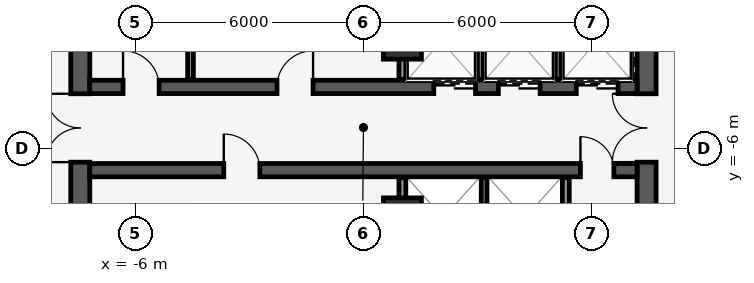
"""IFC4 building model, lengths in metres.
Left out: names, types, materials, properties, quantities, classifications, styles, units other than length and angle.
Written with IfcOpenShell. Run it as: python <this file> out.ifc"""

import sys

from ifc_helpers import new_model, si_unit, direction, frame, frame_2d, origin, origin_2d, place, context, subcontext, project, spatial, rectangle, extrude, element, fill, save


model = new_model("IFC4")
c1 = context("Model", 3, precision=1e-05, world=origin(), true_north=direction((0.0, 1.0)))
c2 = subcontext(c1, "Body", "Model", "MODEL_VIEW")
j1 = project(units=[si_unit("LENGTHUNIT", "METRE"), si_unit("PLANEANGLEUNIT", "RADIAN")], contexts=[c1])
p1 = place(None, origin())
s1 = spatial("IfcSite", under=j1, at=p1, CompositionType="ELEMENT")
p2 = place(p1, origin())
s2 = spatial("IfcBuilding", under=s1, at=p2, CompositionType="ELEMENT")
p3 = place(p2, frame((0.0, 0.0, 310.6)))
s3 = spatial("IfcBuildingStorey", under=s2, at=p3, CompositionType="ELEMENT", Elevation=310.6)
p4 = place(p3, frame((-7.45, -9.0, 0.0), z_axis=(0.0, 0.0, 1.0), x_axis=(0.0, 1.0, 0.0)))
e1 = element("IfcWall", 1, at=p4, inside=s3, PredefinedType="SHEAR", context=c2, shape_type="SweptSolid", body=[
    extrude(rectangle(XDim=9.1, YDim=0.5, at=frame_2d((4.55, 0.0))), origin(), (0.0, 0.0, 1.0), 3.85),
])
p5 = place(p4, frame((2.64, 0.0, 0.0)))
e2 = element("IfcOpeningElement", 2, at=p5, cuts=e1, PredefinedType="OPENING", context=c2, shape_type="SweptSolid", body=[
    extrude(rectangle(XDim=1.8, YDim=2.2, at=frame_2d((0.9, 1.1))), frame((0.0, 0.26, 0.0), z_axis=(0.0, -1.0, 0.0), x_axis=(1.0, 0.0, 0.0)), (0.0, 0.0, 1.0), 0.52),
])
p6 = place(p4, frame((7.55, 0.0, 0.0)))
e3 = element("IfcOpeningElement", 3, at=p6, cuts=e1, PredefinedType="OPENING", context=c2, shape_type="SweptSolid", body=[
    extrude(rectangle(XDim=1.2, YDim=2.15, at=frame_2d((0.6, 1.075))), frame((0.0, 0.26, 0.0), z_axis=(0.0, -1.0, 0.0), x_axis=(1.0, 0.0, 0.0)), (0.0, 0.0, 1.0), 0.52),
])
p7 = place(p3, frame((7.45, -9.0, 0.0), z_axis=(0.0, 0.0, 1.0), x_axis=(0.0, 1.0, 0.0)))
e4 = element("IfcWall", 4, at=p7, inside=s3, PredefinedType="SHEAR", context=c2, shape_type="SweptSolid", body=[
    extrude(rectangle(XDim=9.1, YDim=0.5, at=frame_2d((4.55, 0.0))), origin(), (0.0, 0.0, 1.0), 3.85),
])
p8 = place(p7, frame((2.64, 0.0, 0.0)))
e5 = element("IfcOpeningElement", 5, at=p8, cuts=e4, PredefinedType="OPENING", context=c2, shape_type="SweptSolid", body=[
    extrude(rectangle(XDim=1.8, YDim=2.2, at=frame_2d((0.9, 1.1))), frame((0.0, 0.26, 0.0), z_axis=(0.0, -1.0, 0.0), x_axis=(1.0, 0.0, 0.0)), (0.0, 0.0, 1.0), 0.52),
])
p9 = place(p7, frame((7.55, 0.0, 0.0)))
e6 = element("IfcOpeningElement", 6, at=p9, cuts=e4, PredefinedType="OPENING", context=c2, shape_type="SweptSolid", body=[
    extrude(rectangle(XDim=1.2, YDim=2.15, at=frame_2d((0.6, 1.075))), frame((0.0, 0.26, 0.0), z_axis=(0.0, -1.0, 0.0), x_axis=(1.0, 0.0, 0.0)), (0.0, 0.0, 1.0), 0.52),
])
p10 = place(p3, frame((-7.2, -4.38, 0.0), z_axis=(0.0, 0.0, 1.0), x_axis=(1.0, 0.0, 0.0)))
e7 = element("IfcWall", 7, at=p10, inside=s3, PredefinedType="SHEAR", context=c2, shape_type="SweptSolid", body=[
    extrude(rectangle(XDim=14.4, YDim=0.35, at=frame_2d((7.2, 0.0))), origin(), (0.0, 0.0, 1.0), 3.85),
])
p11 = place(p10, frame((9.05, 0.0, 0.0)))
e8 = element("IfcOpeningElement", 8, at=p11, cuts=e7, PredefinedType="OPENING", context=c2, shape_type="SweptSolid", body=[
    extrude(rectangle(XDim=1.1, YDim=2.2, at=frame_2d((0.55, 1.1))), frame((0.0, 0.185, 0.0), z_axis=(0.0, -1.0, 0.0), x_axis=(1.0, 0.0, 0.0)), (0.0, 0.0, 1.0), 0.37),
])
p12 = place(p10, frame((10.75, 0.0, 0.0)))
e9 = element("IfcOpeningElement", 9, at=p12, cuts=e7, PredefinedType="OPENING", context=c2, shape_type="SweptSolid", body=[
    extrude(rectangle(XDim=1.1, YDim=2.2, at=frame_2d((0.55, 1.1))), frame((0.0, 0.185, 0.0), z_axis=(0.0, -1.0, 0.0), x_axis=(1.0, 0.0, 0.0)), (0.0, 0.0, 1.0), 0.37),
])
p13 = place(p10, frame((12.8, 0.0, 0.0)))
e10 = element("IfcOpeningElement", 10, at=p13, cuts=e7, PredefinedType="OPENING", context=c2, shape_type="SweptSolid", body=[
    extrude(rectangle(XDim=1.1, YDim=2.2, at=frame_2d((0.55, 1.1))), frame((0.0, 0.185, 0.0), z_axis=(0.0, -1.0, 0.0), x_axis=(1.0, 0.0, 0.0)), (0.0, 0.0, 1.0), 0.37),
])
p14 = place(p10, frame((0.875, 0.0, 0.0)))
e11 = element("IfcOpeningElement", 11, at=p14, cuts=e7, PredefinedType="OPENING", context=c2, shape_type="SweptSolid", body=[
    extrude(rectangle(XDim=0.95, YDim=2.15, at=frame_2d((0.475, 1.075))), frame((0.0, 0.185, 0.0), z_axis=(0.0, -1.0, 0.0), x_axis=(1.0, 0.0, 0.0)), (0.0, 0.0, 1.0), 0.37),
])
p15 = place(p10, frame((4.925, 0.0, 0.0)))
e12 = element("IfcOpeningElement", 12, at=p15, cuts=e7, PredefinedType="OPENING", context=c2, shape_type="SweptSolid", body=[
    extrude(rectangle(XDim=0.95, YDim=2.15, at=frame_2d((0.475, 1.075))), frame((0.0, 0.185, 0.0), z_axis=(0.0, -1.0, 0.0), x_axis=(1.0, 0.0, 0.0)), (0.0, 0.0, 1.0), 0.37),
])
p16 = place(p3, frame((-7.2, -6.57, 0.0), z_axis=(0.0, 0.0, 1.0), x_axis=(1.0, 0.0, 0.0)))
e13 = element("IfcWall", 13, at=p16, inside=s3, PredefinedType="SHEAR", context=c2, shape_type="SweptSolid", body=[
    extrude(rectangle(XDim=14.4, YDim=0.35, at=frame_2d((7.2, 0.0))), origin(), (0.0, 0.0, 1.0), 3.85),
])
p17 = place(p16, frame((3.525, 0.0, 0.0)))
e14 = element("IfcOpeningElement", 14, at=p17, cuts=e13, PredefinedType="OPENING", context=c2, shape_type="SweptSolid", body=[
    extrude(rectangle(XDim=0.95, YDim=2.15, at=frame_2d((0.475, 1.075))), frame((0.0, 0.185, 0.0), z_axis=(0.0, -1.0, 0.0), x_axis=(1.0, 0.0, 0.0)), (0.0, 0.0, 1.0), 0.37),
])
p18 = place(p16, frame((12.91, 0.0, 0.0)))
e15 = element("IfcOpeningElement", 15, at=p18, cuts=e13, PredefinedType="OPENING", context=c2, shape_type="SweptSolid", body=[
    extrude(rectangle(XDim=0.88, YDim=2.15, at=frame_2d((0.44, 1.075))), frame((0.0, 0.185, 0.0), z_axis=(0.0, -1.0, 0.0), x_axis=(1.0, 0.0, 0.0)), (0.0, 0.0, 1.0), 0.37),
])
for number, where, z_axis, x_axis in (
    (16, (1.025, -3.15, 0.0), (0.0, 0.0, 1.0), (1.0, 0.0, 0.0)),
    (17, (1.025, -7.8, 0.0), (0.0, 0.0, 1.0), (1.0, 0.0, 0.0)),
):
    element("IfcColumn", number, at=place(p3, frame(where, z_axis=z_axis, x_axis=x_axis)), inside=s3, PredefinedType="COLUMN", context=c2, shape_type="SweptSolid", body=[
        extrude(rectangle(XDim=1.0, YDim=1.0, at=origin_2d()), origin(), (0.0, 0.0, 1.0), 4.1),
    ])
p19 = place(p3, frame((25.8, 9.083, 0.0), z_axis=(0.0, 0.0, 1.0), x_axis=(-0.55919392155, -0.829036885851, 0.0)))
e18 = element("IfcWall", 18, at=p19, inside=s3, PredefinedType="STANDARD", context=c2, shape_type="SweptSolid", body=[
    extrude(rectangle(XDim=43.915, YDim=0.28, at=frame_2d((21.958, 0.0))), origin(), (0.0, 0.0, 1.0), 3.85),
])
p20 = place(p19, frame((21.457, 0.0, 0.0)))
e19 = element("IfcOpeningElement", 19, at=p20, cuts=e18, PredefinedType="OPENING", context=c2, shape_type="SweptSolid", body=[
    extrude(rectangle(XDim=1.0, YDim=2.15, at=frame_2d((0.5, 1.075))), frame((0.0, 0.15, 0.0), z_axis=(0.0, -1.0, 0.0), x_axis=(1.0, 0.0, 0.0)), (0.0, 0.0, 1.0), 0.3),
])
p21 = place(p19, frame((4.607, 0.0, 0.85)))
e20 = element("IfcOpeningElement", 20, at=p21, cuts=e18, PredefinedType="OPENING", context=c2, shape_type="SweptSolid", body=[
    extrude(rectangle(XDim=1.1, YDim=2.15, at=frame_2d((0.55, 1.075))), frame((0.0, 0.15, 0.0), z_axis=(0.0, -1.0, 0.0), x_axis=(1.0, 0.0, 0.0)), (0.0, 0.0, 1.0), 0.3),
])
p22 = place(p19, frame((15.807, 0.0, 0.85)))
e21 = element("IfcOpeningElement", 21, at=p22, cuts=e18, PredefinedType="OPENING", context=c2, shape_type="SweptSolid", body=[
    extrude(rectangle(XDim=1.1, YDim=2.15, at=frame_2d((0.55, 1.075))), frame((0.0, 0.15, 0.0), z_axis=(0.0, -1.0, 0.0), x_axis=(1.0, 0.0, 0.0)), (0.0, 0.0, 1.0), 0.3),
])
p23 = place(p19, frame((27.007, 0.0, 0.85)))
e22 = element("IfcOpeningElement", 22, at=p23, cuts=e18, PredefinedType="OPENING", context=c2, shape_type="SweptSolid", body=[
    extrude(rectangle(XDim=1.1, YDim=2.15, at=frame_2d((0.55, 1.075))), frame((0.0, 0.15, 0.0), z_axis=(0.0, -1.0, 0.0), x_axis=(1.0, 0.0, 0.0)), (0.0, 0.0, 1.0), 0.3),
])
p24 = place(p19, frame((32.607, 0.0, 0.85)))
e23 = element("IfcOpeningElement", 23, at=p24, cuts=e18, PredefinedType="OPENING", context=c2, shape_type="SweptSolid", body=[
    extrude(rectangle(XDim=1.1, YDim=2.15, at=frame_2d((0.55, 1.075))), frame((0.0, 0.15, 0.0), z_axis=(0.0, -1.0, 0.0), x_axis=(1.0, 0.0, 0.0)), (0.0, 0.0, 1.0), 0.3),
])
p25 = place(p19, frame((38.207, 0.0, 0.85)))
e24 = element("IfcOpeningElement", 24, at=p25, cuts=e18, PredefinedType="OPENING", context=c2, shape_type="SweptSolid", body=[
    extrude(rectangle(XDim=1.1, YDim=2.15, at=frame_2d((0.55, 1.075))), frame((0.0, 0.15, 0.0), z_axis=(0.0, -1.0, 0.0), x_axis=(1.0, 0.0, 0.0)), (0.0, 0.0, 1.0), 0.3),
])
p26 = place(p3, frame((-4.988, -26.865, 0.0), z_axis=(0.0, 0.0, 1.0), x_axis=(-0.431592936847, 0.902068476815, 0.0)))
e25 = element("IfcWall", 25, at=p26, inside=s3, PredefinedType="STANDARD", context=c2, shape_type="SweptSolid", body=[
    extrude(rectangle(XDim=43.18, YDim=0.28, at=frame_2d((21.59, 0.0))), origin(), (0.0, 0.0, 1.0), 3.85),
])
p27 = place(p26, frame((4.24, 0.0, 0.85)))
e26 = element("IfcOpeningElement", 26, at=p27, cuts=e25, PredefinedType="OPENING", context=c2, shape_type="SweptSolid", body=[
    extrude(rectangle(XDim=1.1, YDim=2.15, at=frame_2d((0.55, 1.075))), frame((0.0, 0.15, 0.0), z_axis=(0.0, -1.0, 0.0), x_axis=(1.0, 0.0, 0.0)), (0.0, 0.0, 1.0), 0.3),
])
p28 = place(p26, frame((9.84, 0.0, 0.85)))
e27 = element("IfcOpeningElement", 27, at=p28, cuts=e25, PredefinedType="OPENING", context=c2, shape_type="SweptSolid", body=[
    extrude(rectangle(XDim=1.1, YDim=2.15, at=frame_2d((0.55, 1.075))), frame((0.0, 0.15, 0.0), z_axis=(0.0, -1.0, 0.0), x_axis=(1.0, 0.0, 0.0)), (0.0, 0.0, 1.0), 0.3),
])
p29 = place(p26, frame((32.24, 0.0, 0.85)))
e28 = element("IfcOpeningElement", 28, at=p29, cuts=e25, PredefinedType="OPENING", context=c2, shape_type="SweptSolid", body=[
    extrude(rectangle(XDim=1.1, YDim=2.15, at=frame_2d((0.55, 1.075))), frame((0.0, 0.15, 0.0), z_axis=(0.0, -1.0, 0.0), x_axis=(1.0, 0.0, 0.0)), (0.0, 0.0, 1.0), 0.3),
])
p30 = place(p26, frame((37.84, 0.0, 0.85)))
e29 = element("IfcOpeningElement", 29, at=p30, cuts=e25, PredefinedType="OPENING", context=c2, shape_type="SweptSolid", body=[
    extrude(rectangle(XDim=1.1, YDim=2.15, at=frame_2d((0.55, 1.075))), frame((0.0, 0.15, 0.0), z_axis=(0.0, -1.0, 0.0), x_axis=(1.0, 0.0, 0.0)), (0.0, 0.0, 1.0), 0.3),
])
p31 = place(p3, frame((1.025, -4.18, 0.0), z_axis=(0.0, 0.0, 1.0), x_axis=(0.0, 1.0, 0.0)))
e30 = element("IfcWall", 30, at=p31, inside=s3, PredefinedType="PARTITIONING", context=c2, shape_type="SweptSolid", body=[
    extrude(rectangle(XDim=2.03, YDim=0.18, at=frame_2d((1.015, 0.0))), origin(), (0.0, 0.0, 1.0), 2.898),
])
for number, where, z_axis, x_axis in (
    (31, (-4.55, -4.18, 0.0), (0.0, 0.0, 1.0), (0.0, 1.0, 0.0)),
    (32, (3.075, -4.18, 0.0), (0.0, 0.0, 1.0), (0.0, 1.0, 0.0)),
    (33, (5.125, -4.18, 0.0), (0.0, 0.0, 1.0), (0.0, 1.0, 0.0)),
):
    element("IfcWall", number, at=place(p3, frame(where, z_axis=z_axis, x_axis=x_axis)), inside=s3, PredefinedType="PARTITIONING", context=c2, shape_type="SweptSolid", body=[
        extrude(rectangle(XDim=2.03, YDim=0.15, at=frame_2d((1.015, 0.0))), origin(), (0.0, 0.0, 1.0), 3.85),
    ])
p32 = place(p3, frame((1.025, -8.85, 0.0), z_axis=(0.0, 0.0, 1.0), x_axis=(0.0, 1.0, 0.0)))
e34 = element("IfcWall", 34, at=p32, inside=s3, PredefinedType="PARTITIONING", context=c2, shape_type="SweptSolid", body=[
    extrude(rectangle(XDim=2.08, YDim=0.18, at=frame_2d((1.04, 0.0))), origin(), (0.0, 0.0, 1.0), 2.898),
])
p33 = place(p3, frame((3.175, -8.85, 0.0), z_axis=(0.0, 0.0, 1.0), x_axis=(0.0, 1.0, 0.0)))
e35 = element("IfcWall", 35, at=p33, inside=s3, PredefinedType="PARTITIONING", context=c2, shape_type="SweptSolid", body=[
    extrude(rectangle(XDim=2.08, YDim=0.15, at=frame_2d((1.04, 0.0))), origin(), (0.0, 0.0, 1.0), 3.85),
])
p34 = place(p3, frame((5.325, -8.85, 0.0), z_axis=(0.0, 0.0, 1.0), x_axis=(0.0, 1.0, 0.0)))
e36 = element("IfcWall", 36, at=p34, inside=s3, PredefinedType="PARTITIONING", context=c2, shape_type="SweptSolid", body=[
    extrude(rectangle(XDim=2.08, YDim=0.18, at=frame_2d((1.04, 0.0))), origin(), (0.0, 0.0, 1.0), 3.85),
])
p35 = place(p11, origin())
e37 = element("IfcDoor", 37, at=p35, inside=s3, OperationType="DOUBLE_DOOR_SLIDING", PredefinedType="DOOR", context=c2, shape_type="SweptSolid", body=[
    extrude(rectangle(XDim=1.1, YDim=2.2, at=frame_2d((0.55, 1.1))), frame((0.0, 0.025, 0.0), z_axis=(0.0, -1.0, 0.0), x_axis=(1.0, 0.0, 0.0)), (0.0, 0.0, 1.0), 0.05),
])
fill(e8, e37)
p36 = place(p12, origin())
e38 = element("IfcDoor", 38, at=p36, inside=s3, OperationType="DOUBLE_DOOR_SLIDING", PredefinedType="DOOR", context=c2, shape_type="SweptSolid", body=[
    extrude(rectangle(XDim=1.1, YDim=2.2, at=frame_2d((0.55, 1.1))), frame((0.0, 0.025, 0.0), z_axis=(0.0, -1.0, 0.0), x_axis=(1.0, 0.0, 0.0)), (0.0, 0.0, 1.0), 0.05),
])
fill(e9, e38)
p37 = place(p13, origin())
e39 = element("IfcDoor", 39, at=p37, inside=s3, OperationType="DOUBLE_DOOR_SLIDING", PredefinedType="DOOR", context=c2, shape_type="SweptSolid", body=[
    extrude(rectangle(XDim=1.1, YDim=2.2, at=frame_2d((0.55, 1.1))), frame((0.0, 0.025, 0.0), z_axis=(0.0, -1.0, 0.0), x_axis=(1.0, 0.0, 0.0)), (0.0, 0.0, 1.0), 0.05),
])
fill(e10, e39)
p38 = place(p5, origin())
e40 = element("IfcDoor", 40, at=p38, inside=s3, OperationType="DOUBLE_DOOR_SINGLE_SWING", PredefinedType="DOOR", context=c2, shape_type="SweptSolid", body=[
    extrude(rectangle(XDim=1.8, YDim=2.2, at=frame_2d((0.9, 1.1))), frame((0.0, 0.025, 0.0), z_axis=(0.0, -1.0, 0.0), x_axis=(1.0, 0.0, 0.0)), (0.0, 0.0, 1.0), 0.05),
])
fill(e2, e40)
p39 = place(p8, origin())
e41 = element("IfcDoor", 41, at=p39, inside=s3, OperationType="DOUBLE_DOOR_SINGLE_SWING", PredefinedType="DOOR", context=c2, shape_type="SweptSolid", body=[
    extrude(rectangle(XDim=1.8, YDim=2.2, at=frame_2d((0.9, 1.1))), frame((0.0, 0.025, 0.0), z_axis=(0.0, -1.0, 0.0), x_axis=(1.0, 0.0, 0.0)), (0.0, 0.0, 1.0), 0.05),
])
fill(e5, e41)
p40 = place(p14, origin())
e42 = element("IfcDoor", 42, at=p40, inside=s3, OperationType="SINGLE_SWING_LEFT", PredefinedType="DOOR", context=c2, shape_type="SweptSolid", body=[
    extrude(rectangle(XDim=0.95, YDim=2.15, at=frame_2d((0.475, 1.075))), frame((0.0, 0.025, 0.0), z_axis=(0.0, -1.0, 0.0), x_axis=(1.0, 0.0, 0.0)), (0.0, 0.0, 1.0), 0.05),
])
fill(e11, e42)
p41 = place(p15, origin())
e43 = element("IfcDoor", 43, at=p41, inside=s3, OperationType="SINGLE_SWING_RIGHT", PredefinedType="DOOR", context=c2, shape_type="SweptSolid", body=[
    extrude(rectangle(XDim=0.95, YDim=2.15, at=frame_2d((0.475, 1.075))), frame((0.0, 0.025, 0.0), z_axis=(0.0, -1.0, 0.0), x_axis=(1.0, 0.0, 0.0)), (0.0, 0.0, 1.0), 0.05),
])
fill(e12, e43)
p42 = place(p17, origin())
e44 = element("IfcDoor", 44, at=p42, inside=s3, OperationType="SINGLE_SWING_LEFT", PredefinedType="DOOR", context=c2, shape_type="SweptSolid", body=[
    extrude(rectangle(XDim=0.95, YDim=2.15, at=frame_2d((0.475, 1.075))), frame((0.0, 0.025, 0.0), z_axis=(0.0, -1.0, 0.0), x_axis=(1.0, 0.0, 0.0)), (0.0, 0.0, 1.0), 0.05),
])
fill(e14, e44)
p43 = place(p18, origin())
e45 = element("IfcDoor", 45, at=p43, inside=s3, OperationType="SINGLE_SWING_LEFT", PredefinedType="DOOR", context=c2, shape_type="SweptSolid", body=[
    extrude(rectangle(XDim=0.88, YDim=2.15, at=frame_2d((0.44, 1.075))), frame((0.0, 0.025, 0.0), z_axis=(0.0, -1.0, 0.0), x_axis=(1.0, 0.0, 0.0)), (0.0, 0.0, 1.0), 0.05),
])
fill(e15, e45)
save(model, sys.argv[1])
